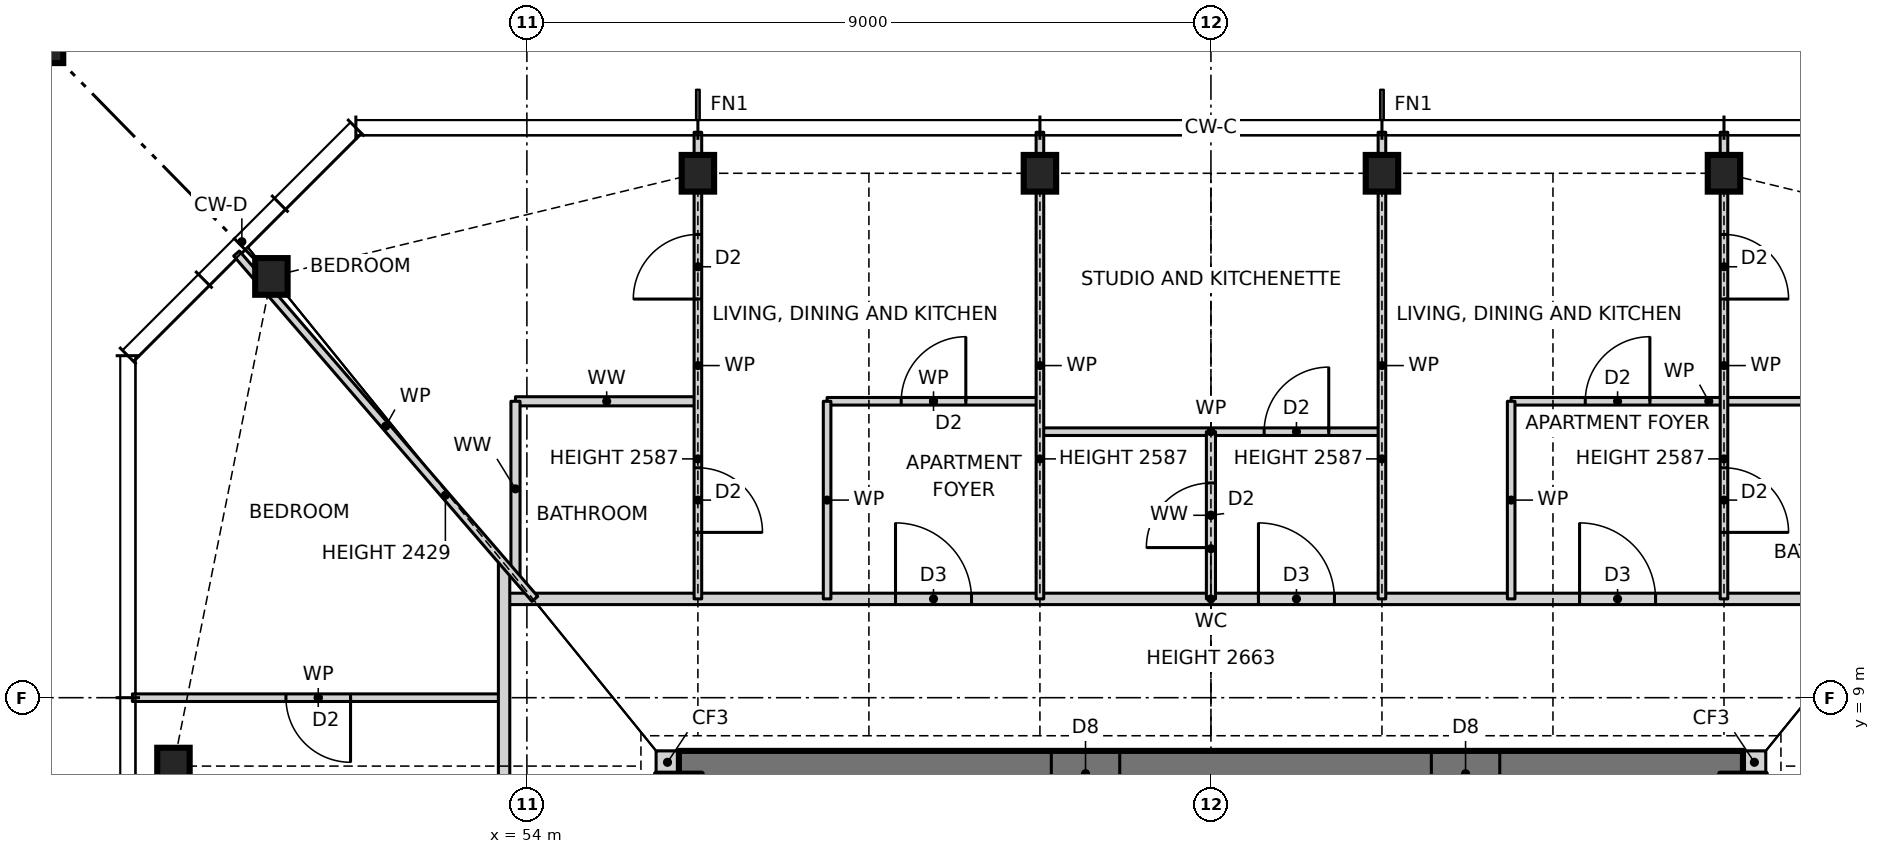
"""IFC4 building model, lengths in metres.
Left out: names, types, materials, properties, quantities, classifications, styles, units other than length and angle.
Written with IfcOpenShell. Run it as: python <this file> out.ifc"""

import sys

from ifc_helpers import new_model, si_unit, direction, frame, frame_2d, origin, origin_2d, place, context, subcontext, project, spatial, rectangle, hollow_rectangle, i_section, extrude, element, fill, save


model = new_model("IFC4")
c1 = context("Model", 3, precision=1e-05, world=origin(), true_north=direction((0.0, 1.0)))
c2 = subcontext(c1, "Body", "Model", "MODEL_VIEW")
j1 = project(units=[si_unit("LENGTHUNIT", "METRE"), si_unit("PLANEANGLEUNIT", "RADIAN")], contexts=[c1])
p1 = place(None, origin())
s1 = spatial("IfcSite", under=j1, at=p1, CompositionType="ELEMENT")
p2 = place(p1, origin())
s2 = spatial("IfcBuilding", under=s1, at=p2, CompositionType="ELEMENT")
p3 = place(p2, frame((0.0, 0.0, 91.0)))
s3 = spatial("IfcBuildingStorey", under=s2, at=p3, CompositionType="ELEMENT", Elevation=91.0)
for number, where, z_axis, x_axis in (
    (1, (69.75, 15.9, 0.0), (0.0, 0.0, 1.0), (1.0, 0.0, 0.0)),
    (2, (65.25, 15.9, 0.0), (0.0, 0.0, 1.0), (1.0, 0.0, 0.0)),
    (3, (60.75, 15.9, 0.0), (0.0, 0.0, 1.0), (1.0, 0.0, 0.0)),
    (4, (56.25, 15.9, 0.0), (0.0, 0.0, 1.0), (1.0, 0.0, 0.0)),
    (5, (50.639, 14.543, 0.0), (0.0, 0.0, 1.0), (1.0, 0.0, 0.0)),
    (6, (49.35, 8.1, 0.0), (0.0, 0.0, 1.0), (1.0, 0.0, 0.0)),
):
    element("IfcColumn", number, at=place(p3, frame(where, z_axis=z_axis, x_axis=x_axis)), inside=s3, PredefinedType="COLUMN", context=c2, shape_type="SweptSolid", body=[
        extrude(i_section(OverallWidth=0.427, OverallDepth=0.483, WebThickness=0.051, FlangeThickness=0.082, at=origin_2d()), origin(), (0.0, 0.0, 1.0), 3.5),
    ])
p4 = place(p3, frame((47.35, 17.9, 0.0), z_axis=(0.0, 0.0, 1.0), x_axis=(1.0, 0.0, 0.0)))
e7 = element("IfcColumn", 7, at=p4, inside=s3, PredefinedType="COLUMN", context=c2, shape_type="SweptSolid", body=[
    extrude(hollow_rectangle(XDim=1.1, YDim=1.1, WallThickness=0.06, at=origin_2d()), origin(), (0.0, 0.0, 1.0), 3.5),
])
for number, where, z_axis, x_axis in (
    (8, (70.0, 8.15, 0.0), (0.0, 0.0, 1.0), (1.0, 0.0, 0.0)),
    (9, (55.7, 8.15, 0.0), (0.0, 0.0, 1.0), (1.0, 0.0, 0.0)),
):
    element("IfcWall", number, at=place(p3, frame(where, z_axis=z_axis, x_axis=x_axis)), inside=s3, PredefinedType="SOLIDWALL", context=c2, shape_type="SweptSolid", body=[
        extrude(rectangle(XDim=0.3, YDim=0.3, at=frame_2d((0.15, 0.0))), origin(), (0.0, 0.0, 1.0), 3.5),
    ])
p5 = place(p3, frame((70.0, 8.0, 0.0), z_axis=(0.0, 0.0, 1.0), x_axis=(-1.0, 0.0, 0.0)))
e10 = element("IfcWall", 10, at=p5, inside=s3, PredefinedType="SHEAR", context=c2, shape_type="SweptSolid", body=[
    extrude(rectangle(XDim=14.0, YDim=0.6, at=frame_2d((7.0, 0.0))), origin(), (0.0, 0.0, 1.0), 3.5),
])
p6 = place(p5, frame((8.2, 0.0, 0.0)))
e11 = element("IfcOpeningElement", 11, at=p6, cuts=e10, PredefinedType="OPENING", context=c2, shape_type="SweptSolid", body=[
    extrude(rectangle(XDim=0.9, YDim=2.1, at=frame_2d((0.45, 1.05))), frame((0.0, 0.31, 0.0), z_axis=(0.0, -1.0, 0.0), x_axis=(1.0, 0.0, 0.0)), (0.0, 0.0, 1.0), 0.62),
])
p7 = place(p5, frame((3.2, 0.0, 0.0)))
e12 = element("IfcOpeningElement", 12, at=p7, cuts=e10, PredefinedType="OPENING", context=c2, shape_type="SweptSolid", body=[
    extrude(rectangle(XDim=0.9, YDim=2.1, at=frame_2d((0.45, 1.05))), frame((0.0, 0.31, 0.0), z_axis=(0.0, -1.0, 0.0), x_axis=(1.0, 0.0, 0.0)), (0.0, 0.0, 1.0), 0.62),
])
p8 = place(p3, frame((48.81, 9.0, 0.0), z_axis=(0.0, 0.0, 1.0), x_axis=(1.0, 0.0, 0.0)))
e13 = element("IfcWall", 13, at=p8, inside=s3, PredefinedType="PARTITIONING", context=c2, shape_type="SweptSolid", body=[
    extrude(rectangle(XDim=4.89, YDim=0.1, at=frame_2d((2.445, 0.0))), origin(), (0.0, 0.0, 1.0), 3.27),
])
p9 = place(p8, frame((2.02, 0.0, 0.0)))
e14 = element("IfcOpeningElement", 14, at=p9, cuts=e13, PredefinedType="OPENING", context=c2, shape_type="SweptSolid", body=[
    extrude(rectangle(XDim=0.85, YDim=2.1, at=frame_2d((0.425, 1.05))), frame((0.0, 0.06, 0.0), z_axis=(0.0, -1.0, 0.0), x_axis=(1.0, 0.0, 0.0)), (0.0, 0.0, 1.0), 0.12),
])
p10 = place(p3, frame((53.7, 10.3, 0.0), z_axis=(0.0, 0.0, 1.0), x_axis=(1.0, 0.0, 0.0)))
e15 = element("IfcWall", 15, at=p10, inside=s3, PredefinedType="PARTITIONING", context=c2, shape_type="SweptSolid", body=[
    extrude(rectangle(XDim=18.6, YDim=0.15, at=frame_2d((9.3, 0.0))), origin(), (0.0, 0.0, 1.0), 3.27),
])
p11 = place(p10, frame((14.15, 0.0, 0.0)))
e16 = element("IfcOpeningElement", 16, at=p11, cuts=e15, PredefinedType="OPENING", context=c2, shape_type="SweptSolid", body=[
    extrude(rectangle(XDim=1.0, YDim=2.1, at=frame_2d((0.5, 1.05))), frame((0.0, 0.085, 0.0), z_axis=(0.0, -1.0, 0.0), x_axis=(1.0, 0.0, 0.0)), (0.0, 0.0, 1.0), 0.17),
])
p12 = place(p10, frame((9.925, 0.0, 0.0)))
e17 = element("IfcOpeningElement", 17, at=p12, cuts=e15, PredefinedType="OPENING", context=c2, shape_type="SweptSolid", body=[
    extrude(rectangle(XDim=1.0, YDim=2.1, at=frame_2d((0.5, 1.05))), frame((0.0, 0.085, 0.0), z_axis=(0.0, -1.0, 0.0), x_axis=(1.0, 0.0, 0.0)), (0.0, 0.0, 1.0), 0.17),
])
p13 = place(p10, frame((5.15, 0.0, 0.0)))
e18 = element("IfcOpeningElement", 18, at=p13, cuts=e15, PredefinedType="OPENING", context=c2, shape_type="SweptSolid", body=[
    extrude(rectangle(XDim=1.0, YDim=2.1, at=frame_2d((0.5, 1.05))), frame((0.0, 0.085, 0.0), z_axis=(0.0, -1.0, 0.0), x_axis=(1.0, 0.0, 0.0)), (0.0, 0.0, 1.0), 0.17),
])
p14 = place(p3, frame((60.75, 12.5, 0.0), z_axis=(0.0, 0.0, 1.0), x_axis=(1.0, 0.0, 0.0)))
e19 = element("IfcWall", 19, at=p14, inside=s3, PredefinedType="PARTITIONING", context=c2, shape_type="SweptSolid", body=[
    extrude(rectangle(XDim=4.5, YDim=0.1, at=frame_2d((2.25, 0.0))), origin(), (0.0, 0.0, 1.0), 3.27),
])
p15 = place(p14, frame((2.95, 0.0, 0.0)))
e20 = element("IfcOpeningElement", 20, at=p15, cuts=e19, PredefinedType="OPENING", context=c2, shape_type="SweptSolid", body=[
    extrude(rectangle(XDim=0.85, YDim=2.1, at=frame_2d((0.425, 1.05))), frame((0.0, 0.06, 0.0), z_axis=(0.0, -1.0, 0.0), x_axis=(1.0, 0.0, 0.0)), (0.0, 0.0, 1.0), 0.12),
])
p16 = place(p3, frame((53.85, 12.9, 0.0), z_axis=(0.0, 0.0, 1.0), x_axis=(1.0, 0.0, 0.0)))
e21 = element("IfcWall", 21, at=p16, inside=s3, PredefinedType="PARTITIONING", context=c2, shape_type="SweptSolid", body=[
    extrude(rectangle(XDim=2.4, YDim=0.12, at=frame_2d((1.2, 0.0))), origin(), (0.0, 0.0, 1.0), 3.27),
])
p17 = place(p3, frame((57.95, 12.9, 0.0), z_axis=(0.0, 0.0, 1.0), x_axis=(1.0, 0.0, 0.0)))
e22 = element("IfcWall", 22, at=p17, inside=s3, PredefinedType="PARTITIONING", context=c2, shape_type="SweptSolid", body=[
    extrude(rectangle(XDim=2.8, YDim=0.1, at=frame_2d((1.4, 0.0))), origin(), (0.0, 0.0, 1.0), 3.27),
])
p18 = place(p17, frame((0.975, 0.0, 0.0)))
e23 = element("IfcOpeningElement", 23, at=p18, cuts=e22, PredefinedType="OPENING", context=c2, shape_type="SweptSolid", body=[
    extrude(rectangle(XDim=0.85, YDim=2.1, at=frame_2d((0.425, 1.05))), frame((0.0, 0.06, 0.0), z_axis=(0.0, -1.0, 0.0), x_axis=(1.0, 0.0, 0.0)), (0.0, 0.0, 1.0), 0.12),
])
p19 = place(p3, frame((66.95, 12.9, 0.0), z_axis=(0.0, 0.0, 1.0), x_axis=(1.0, 0.0, 0.0)))
e24 = element("IfcWall", 24, at=p19, inside=s3, PredefinedType="PARTITIONING", context=c2, shape_type="SweptSolid", body=[
    extrude(rectangle(XDim=5.2, YDim=0.1, at=frame_2d((2.6, 0.0))), origin(), (0.0, 0.0, 1.0), 3.27),
])
p20 = place(p19, frame((0.975, 0.0, 0.0)))
e25 = element("IfcOpeningElement", 25, at=p20, cuts=e24, PredefinedType="OPENING", context=c2, shape_type="SweptSolid", body=[
    extrude(rectangle(XDim=0.85, YDim=2.1, at=frame_2d((0.425, 1.05))), frame((0.0, 0.06, 0.0), z_axis=(0.0, -1.0, 0.0), x_axis=(1.0, 0.0, 0.0)), (0.0, 0.0, 1.0), 0.12),
])
p21 = place(p3, frame((69.75, 10.3, 0.0), z_axis=(0.0, 0.0, 1.0), x_axis=(0.0, 1.0, 0.0)))
e26 = element("IfcWall", 26, at=p21, inside=s3, PredefinedType="PARTITIONING", context=c2, shape_type="SweptSolid", body=[
    extrude(rectangle(XDim=6.14, YDim=0.1, at=frame_2d((3.07, 0.0))), origin(), (0.0, 0.0, 1.0), 2.587),
])
p22 = place(p21, frame((0.875, 0.0, 0.0)))
e27 = element("IfcOpeningElement", 27, at=p22, cuts=e26, PredefinedType="OPENING", context=c2, shape_type="SweptSolid", body=[
    extrude(rectangle(XDim=0.85, YDim=2.1, at=frame_2d((0.425, 1.05))), frame((0.0, 0.06, 0.0), z_axis=(0.0, -1.0, 0.0), x_axis=(1.0, 0.0, 0.0)), (0.0, 0.0, 1.0), 0.12),
])
p23 = place(p21, frame((3.945, 0.0, 0.0)))
e28 = element("IfcOpeningElement", 28, at=p23, cuts=e26, PredefinedType="OPENING", context=c2, shape_type="SweptSolid", body=[
    extrude(rectangle(XDim=0.85, YDim=2.1, at=frame_2d((0.425, 1.05))), frame((0.0, 0.06, 0.0), z_axis=(0.0, -1.0, 0.0), x_axis=(1.0, 0.0, 0.0)), (0.0, 0.0, 1.0), 0.12),
])
p24 = place(p3, frame((66.95, 10.3, 0.0), z_axis=(0.0, 0.0, 1.0), x_axis=(0.0, 1.0, 0.0)))
e29 = element("IfcWall", 29, at=p24, inside=s3, PredefinedType="PARTITIONING", context=c2, shape_type="SweptSolid", body=[
    extrude(rectangle(XDim=2.6, YDim=0.1, at=frame_2d((1.3, 0.0))), origin(), (0.0, 0.0, 1.0), 3.27),
])
p25 = place(p3, frame((65.25, 10.3, 0.0), z_axis=(0.0, 0.0, 1.0), x_axis=(0.0, 1.0, 0.0)))
e30 = element("IfcWall", 30, at=p25, inside=s3, PredefinedType="PARTITIONING", context=c2, shape_type="SweptSolid", body=[
    extrude(rectangle(XDim=6.14, YDim=0.1, at=frame_2d((3.07, 0.0))), origin(), (0.0, 0.0, 1.0), 2.587),
])
p26 = place(p3, frame((63.0, 10.3, 0.0), z_axis=(0.0, 0.0, 1.0), x_axis=(0.0, 1.0, 0.0)))
e31 = element("IfcWall", 31, at=p26, inside=s3, PredefinedType="PARTITIONING", context=c2, shape_type="SweptSolid", body=[
    extrude(rectangle(XDim=2.2, YDim=0.12, at=frame_2d((1.1, 0.0))), origin(), (0.0, 0.0, 1.0), 2.663),
])
p27 = place(p26, frame((0.675, 0.0, 0.0)))
e32 = element("IfcOpeningElement", 32, at=p27, cuts=e31, PredefinedType="OPENING", context=c2, shape_type="SweptSolid", body=[
    extrude(rectangle(XDim=0.85, YDim=2.1, at=frame_2d((0.425, 1.05))), frame((0.0, 0.07, 0.0), z_axis=(0.0, -1.0, 0.0), x_axis=(1.0, 0.0, 0.0)), (0.0, 0.0, 1.0), 0.14),
])
p28 = place(p3, frame((60.75, 10.3, 0.0), z_axis=(0.0, 0.0, 1.0), x_axis=(0.0, 1.0, 0.0)))
e33 = element("IfcWall", 33, at=p28, inside=s3, PredefinedType="PARTITIONING", context=c2, shape_type="SweptSolid", body=[
    extrude(rectangle(XDim=6.14, YDim=0.1, at=frame_2d((3.07, 0.0))), origin(), (0.0, 0.0, 1.0), 2.587),
])
p29 = place(p3, frame((57.95, 10.3, 0.0), z_axis=(0.0, 0.0, 1.0), x_axis=(0.0, 1.0, 0.0)))
e34 = element("IfcWall", 34, at=p29, inside=s3, PredefinedType="PARTITIONING", context=c2, shape_type="SweptSolid", body=[
    extrude(rectangle(XDim=2.6, YDim=0.1, at=frame_2d((1.3, 0.0))), origin(), (0.0, 0.0, 1.0), 3.27),
])
p30 = place(p3, frame((56.25, 10.3, 0.0), z_axis=(0.0, 0.0, 1.0), x_axis=(0.0, 1.0, 0.0)))
e35 = element("IfcWall", 35, at=p30, inside=s3, PredefinedType="PARTITIONING", context=c2, shape_type="SweptSolid", body=[
    extrude(rectangle(XDim=6.14, YDim=0.1, at=frame_2d((3.07, 0.0))), origin(), (0.0, 0.0, 1.0), 2.587),
])
p31 = place(p30, frame((0.875, 0.0, 0.0)))
e36 = element("IfcOpeningElement", 36, at=p31, cuts=e35, PredefinedType="OPENING", context=c2, shape_type="SweptSolid", body=[
    extrude(rectangle(XDim=0.85, YDim=2.1, at=frame_2d((0.425, 1.05))), frame((0.0, 0.06, 0.0), z_axis=(0.0, -1.0, 0.0), x_axis=(1.0, 0.0, 0.0)), (0.0, 0.0, 1.0), 0.12),
])
p32 = place(p30, frame((3.945, 0.0, 0.0)))
e37 = element("IfcOpeningElement", 37, at=p32, cuts=e35, PredefinedType="OPENING", context=c2, shape_type="SweptSolid", body=[
    extrude(rectangle(XDim=0.85, YDim=2.1, at=frame_2d((0.425, 1.05))), frame((0.0, 0.06, 0.0), z_axis=(0.0, -1.0, 0.0), x_axis=(1.0, 0.0, 0.0)), (0.0, 0.0, 1.0), 0.12),
])
p33 = place(p3, frame((53.85, 10.595, 0.0), z_axis=(0.0, 0.0, 1.0), x_axis=(0.0, 1.0, 0.0)))
e38 = element("IfcWall", 38, at=p33, inside=s3, PredefinedType="PARTITIONING", context=c2, shape_type="SweptSolid", body=[
    extrude(rectangle(XDim=2.305, YDim=0.12, at=frame_2d((1.152, 0.0))), origin(), (0.0, 0.0, 1.0), 3.27),
])
p34 = place(p3, frame((53.7, -10.768, 0.0), z_axis=(0.0, 0.0, 1.0), x_axis=(0.0, 1.0, 0.0)))
e39 = element("IfcWall", 39, at=p34, inside=s3, PredefinedType="PARTITIONING", context=c2, shape_type="SweptSolid", body=[
    extrude(rectangle(XDim=21.536, YDim=0.15, at=frame_2d((10.768, 0.0))), origin(), (0.0, 0.0, 1.0), 3.27),
])
p35 = place(p34, frame((10.268, 0.0, 0.0)))
e40 = element("IfcOpeningElement", 40, at=p35, cuts=e39, PredefinedType="OPENING", context=c2, shape_type="SweptSolid", body=[
    extrude(rectangle(XDim=1.0, YDim=2.1, at=frame_2d((0.5, 1.05))), frame((0.0, 0.085, 0.0), z_axis=(0.0, -1.0, 0.0), x_axis=(1.0, 0.0, 0.0)), (0.0, 0.0, 1.0), 0.17),
])
p36 = place(p3, frame((54.105, 10.3, 0.0), z_axis=(0.0, 0.0, 1.0), x_axis=(-0.653606109319, 0.756834892074, 0.0)))
e41 = element("IfcWall", 41, at=p36, inside=s3, PredefinedType="PARTITIONING", context=c2, shape_type="SweptSolid", body=[
    extrude(rectangle(XDim=6.005, YDim=0.1, at=frame_2d((3.002, 0.0))), origin(), (0.0, 0.0, 1.0), 2.429),
])
p37 = place(p11, origin())
e42 = element("IfcDoor", 42, at=p37, inside=s3, OperationType="SINGLE_SWING_LEFT", PredefinedType="DOOR", context=c2, shape_type="SweptSolid", body=[
    extrude(rectangle(XDim=1.0, YDim=2.1, at=frame_2d((0.5, 1.05))), frame((0.0, 0.025, 0.0), z_axis=(0.0, -1.0, 0.0), x_axis=(1.0, 0.0, 0.0)), (0.0, 0.0, 1.0), 0.05),
])
fill(e16, e42)
p38 = place(p20, origin())
e43 = element("IfcDoor", 43, at=p38, inside=s3, OperationType="SINGLE_SWING_RIGHT", PredefinedType="DOOR", context=c2, shape_type="SweptSolid", body=[
    extrude(rectangle(XDim=0.85, YDim=2.1, at=frame_2d((0.425, 1.05))), frame((0.0, 0.025, 0.0), z_axis=(0.0, -1.0, 0.0), x_axis=(1.0, 0.0, 0.0)), (0.0, 0.0, 1.0), 0.05),
])
fill(e25, e43)
p39 = place(p22, frame((0.85, 0.0, 0.0), z_axis=(0.0, 0.0, 1.0), x_axis=(-1.0, 0.0, 0.0)))
e44 = element("IfcDoor", 44, at=p39, inside=s3, OperationType="SINGLE_SWING_RIGHT", PredefinedType="DOOR", context=c2, shape_type="SweptSolid", body=[
    extrude(rectangle(XDim=0.85, YDim=2.1, at=frame_2d((0.425, 1.05))), frame((0.0, 0.025, 0.0), z_axis=(0.0, -1.0, 0.0), x_axis=(1.0, 0.0, 0.0)), (0.0, 0.0, 1.0), 0.05),
])
fill(e27, e44)
p40 = place(p23, frame((0.85, 0.0, 0.0), z_axis=(0.0, 0.0, 1.0), x_axis=(-1.0, 0.0, 0.0)))
e45 = element("IfcDoor", 45, at=p40, inside=s3, OperationType="SINGLE_SWING_RIGHT", PredefinedType="DOOR", context=c2, shape_type="SweptSolid", body=[
    extrude(rectangle(XDim=0.85, YDim=2.1, at=frame_2d((0.425, 1.05))), frame((0.0, 0.025, 0.0), z_axis=(0.0, -1.0, 0.0), x_axis=(1.0, 0.0, 0.0)), (0.0, 0.0, 1.0), 0.05),
])
fill(e28, e45)
p41 = place(p15, origin())
e46 = element("IfcDoor", 46, at=p41, inside=s3, OperationType="SINGLE_SWING_RIGHT", PredefinedType="DOOR", context=c2, shape_type="SweptSolid", body=[
    extrude(rectangle(XDim=0.85, YDim=2.1, at=frame_2d((0.425, 1.05))), frame((0.0, 0.025, 0.0), z_axis=(0.0, -1.0, 0.0), x_axis=(1.0, 0.0, 0.0)), (0.0, 0.0, 1.0), 0.05),
])
fill(e20, e46)
p42 = place(p12, origin())
e47 = element("IfcDoor", 47, at=p42, inside=s3, OperationType="SINGLE_SWING_LEFT", PredefinedType="DOOR", context=c2, shape_type="SweptSolid", body=[
    extrude(rectangle(XDim=1.0, YDim=2.1, at=frame_2d((0.5, 1.05))), frame((0.0, 0.025, 0.0), z_axis=(0.0, -1.0, 0.0), x_axis=(1.0, 0.0, 0.0)), (0.0, 0.0, 1.0), 0.05),
])
fill(e17, e47)
p43 = place(p27, origin())
e48 = element("IfcDoor", 48, at=p43, inside=s3, OperationType="SINGLE_SWING_LEFT", PredefinedType="DOOR", context=c2, shape_type="SweptSolid", body=[
    extrude(rectangle(XDim=0.85, YDim=2.1, at=frame_2d((0.425, 1.05))), frame((0.0, 0.025, 0.0), z_axis=(0.0, -1.0, 0.0), x_axis=(1.0, 0.0, 0.0)), (0.0, 0.0, 1.0), 0.05),
])
fill(e32, e48)
p44 = place(p13, origin())
e49 = element("IfcDoor", 49, at=p44, inside=s3, OperationType="SINGLE_SWING_LEFT", PredefinedType="DOOR", context=c2, shape_type="SweptSolid", body=[
    extrude(rectangle(XDim=1.0, YDim=2.1, at=frame_2d((0.5, 1.05))), frame((0.0, 0.025, 0.0), z_axis=(0.0, -1.0, 0.0), x_axis=(1.0, 0.0, 0.0)), (0.0, 0.0, 1.0), 0.05),
])
fill(e18, e49)
p45 = place(p18, origin())
e50 = element("IfcDoor", 50, at=p45, inside=s3, OperationType="SINGLE_SWING_RIGHT", PredefinedType="DOOR", context=c2, shape_type="SweptSolid", body=[
    extrude(rectangle(XDim=0.85, YDim=2.1, at=frame_2d((0.425, 1.05))), frame((0.0, 0.025, 0.0), z_axis=(0.0, -1.0, 0.0), x_axis=(1.0, 0.0, 0.0)), (0.0, 0.0, 1.0), 0.05),
])
fill(e23, e50)
p46 = place(p31, frame((0.85, 0.0, 0.0), z_axis=(0.0, 0.0, 1.0), x_axis=(-1.0, 0.0, 0.0)))
e51 = element("IfcDoor", 51, at=p46, inside=s3, OperationType="SINGLE_SWING_RIGHT", PredefinedType="DOOR", context=c2, shape_type="SweptSolid", body=[
    extrude(rectangle(XDim=0.85, YDim=2.1, at=frame_2d((0.425, 1.05))), frame((0.0, 0.025, 0.0), z_axis=(0.0, -1.0, 0.0), x_axis=(1.0, 0.0, 0.0)), (0.0, 0.0, 1.0), 0.05),
])
fill(e36, e51)
p47 = place(p32, origin())
e52 = element("IfcDoor", 52, at=p47, inside=s3, OperationType="SINGLE_SWING_LEFT", PredefinedType="DOOR", context=c2, shape_type="SweptSolid", body=[
    extrude(rectangle(XDim=0.85, YDim=2.1, at=frame_2d((0.425, 1.05))), frame((0.0, 0.025, 0.0), z_axis=(0.0, -1.0, 0.0), x_axis=(1.0, 0.0, 0.0)), (0.0, 0.0, 1.0), 0.05),
])
fill(e37, e52)
p48 = place(p9, frame((0.85, 0.0, 0.0), z_axis=(0.0, 0.0, 1.0), x_axis=(-1.0, 0.0, 0.0)))
e53 = element("IfcDoor", 53, at=p48, inside=s3, OperationType="SINGLE_SWING_LEFT", PredefinedType="DOOR", context=c2, shape_type="SweptSolid", body=[
    extrude(rectangle(XDim=0.85, YDim=2.1, at=frame_2d((0.425, 1.05))), frame((0.0, 0.025, 0.0), z_axis=(0.0, -1.0, 0.0), x_axis=(1.0, 0.0, 0.0)), (0.0, 0.0, 1.0), 0.05),
])
fill(e14, e53)
p49 = place(p6, origin())
e54 = element("IfcDoor", 54, at=p49, inside=s3, OperationType="SINGLE_SWING_RIGHT", PredefinedType="DOOR", context=c2, shape_type="SweptSolid", body=[
    extrude(rectangle(XDim=0.9, YDim=2.1, at=frame_2d((0.45, 1.05))), frame((0.0, 0.025, 0.0), z_axis=(0.0, -1.0, 0.0), x_axis=(1.0, 0.0, 0.0)), (0.0, 0.0, 1.0), 0.05),
])
fill(e11, e54)
p50 = place(p7, origin())
e55 = element("IfcDoor", 55, at=p50, inside=s3, OperationType="SINGLE_SWING_RIGHT", PredefinedType="DOOR", context=c2, shape_type="SweptSolid", body=[
    extrude(rectangle(XDim=0.9, YDim=2.1, at=frame_2d((0.45, 1.05))), frame((0.0, 0.025, 0.0), z_axis=(0.0, -1.0, 0.0), x_axis=(1.0, 0.0, 0.0)), (0.0, 0.0, 1.0), 0.05),
])
fill(e12, e55)
save(model, sys.argv[1])
